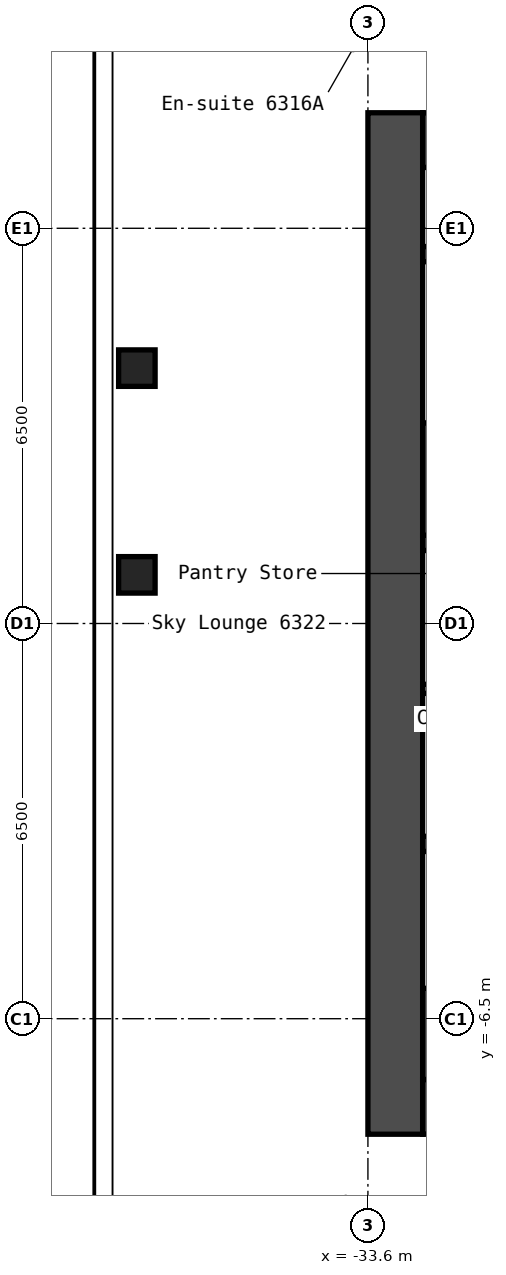
"""IFC4 building model, lengths in metres.
Left out: names, types, materials, properties, quantities, classifications, styles, units other than length and angle.
Written with IfcOpenShell. Run it as: python <this file> out.ifc"""

import sys

from ifc_helpers import new_model, si_unit, direction, frame, frame_2d, origin, origin_2d, place, context, subcontext, project, spatial, rectangle, hollow_rectangle, extrude, element, save


model = new_model("IFC4")
c1 = context("Model", 3, precision=1e-05, world=origin(), true_north=direction((0.0, 1.0)))
c2 = subcontext(c1, "Body", "Model", "MODEL_VIEW")
j1 = project(units=[si_unit("LENGTHUNIT", "METRE"), si_unit("PLANEANGLEUNIT", "RADIAN")], contexts=[c1])
p1 = place(None, origin())
s1 = spatial("IfcSite", under=j1, at=p1, CompositionType="ELEMENT")
p2 = place(p1, origin())
s2 = spatial("IfcBuilding", under=s1, at=p2, CompositionType="ELEMENT")
p3 = place(p2, frame((0.0, 0.0, 221.8)))
s3 = spatial("IfcBuildingStorey", under=s2, at=p3, CompositionType="ELEMENT", Elevation=221.8)
for number, where, z_axis, x_axis in (
    (1, (-37.4, 0.8, 0.0), (0.0, 0.0, 1.0), (1.0, 0.0, 0.0)),
    (2, (-37.4, 4.2, 0.0), (0.0, 0.0, 1.0), (1.0, 0.0, 0.0)),
):
    element("IfcColumn", number, at=place(p3, frame(where, z_axis=z_axis, x_axis=x_axis)), inside=s3, PredefinedType="COLUMN", context=c2, shape_type="SweptSolid", body=[
        extrude(hollow_rectangle(XDim=0.6, YDim=0.6, WallThickness=0.025, InnerFilletRadius=0.038, OuterFilletRadius=0.062, at=origin_2d()), origin(), (0.0, 0.0, 1.0), 2.75),
    ])
p4 = place(p3, frame((-33.15, -8.4, 0.0), z_axis=(0.0, 0.0, 1.0), x_axis=(0.0, 1.0, 0.0)))
e3 = element("IfcWall", 3, at=p4, inside=s3, PredefinedType="SHEAR", context=c2, shape_type="SweptSolid", body=[
    extrude(rectangle(XDim=16.8, YDim=0.9, at=frame_2d((8.4, 0.0))), origin(), (0.0, 0.0, 1.0), 2.75),
])
p5 = place(p3, frame((-32.7, 7.95, 0.0), z_axis=(0.0, 0.0, 1.0), x_axis=(1.0, 0.0, 0.0)))
e4 = element("IfcWall", 4, at=p5, inside=s3, PredefinedType="SHEAR", context=c2, shape_type="SweptSolid", body=[
    extrude(rectangle(XDim=15.0, YDim=0.9, at=frame_2d((7.5, 0.0))), origin(), (0.0, 0.0, 1.0), 2.75),
])
p6 = place(p5, frame((3.4, 0.0, 0.0)))
e5 = element("IfcOpeningElement", 5, at=p6, cuts=e4, PredefinedType="OPENING", context=c2, shape_type="SweptSolid", body=[
    extrude(rectangle(XDim=1.2, YDim=2.1, at=frame_2d((0.6, 1.05))), frame((0.0, 0.46, 0.0), z_axis=(0.0, -1.0, 0.0), x_axis=(1.0, 0.0, 0.0)), (0.0, 0.0, 1.0), 0.92),
])
p7 = place(p5, frame((0.75, 0.0, 0.0)))
e6 = element("IfcOpeningElement", 6, at=p7, cuts=e4, PredefinedType="OPENING", context=c2, shape_type="SweptSolid", body=[
    extrude(rectangle(XDim=0.9, YDim=2.1, at=frame_2d((0.45, 1.05))), frame((0.0, 0.46, 0.0), z_axis=(0.0, -1.0, 0.0), x_axis=(1.0, 0.0, 0.0)), (0.0, 0.0, 1.0), 0.92),
])
p8 = place(p3, frame((-32.7, -7.95, 0.0), z_axis=(0.0, 0.0, 1.0), x_axis=(1.0, 0.0, 0.0)))
e7 = element("IfcWall", 7, at=p8, inside=s3, PredefinedType="SHEAR", context=c2, shape_type="SweptSolid", body=[
    extrude(rectangle(XDim=15.0, YDim=0.9, at=frame_2d((7.5, 0.0))), origin(), (0.0, 0.0, 1.0), 2.75),
])
p9 = place(p8, frame((11.45, 0.0, 0.0)))
e8 = element("IfcOpeningElement", 8, at=p9, cuts=e7, PredefinedType="OPENING", context=c2, shape_type="SweptSolid", body=[
    extrude(rectangle(XDim=1.0, YDim=2.1, at=frame_2d((0.5, 1.05))), frame((0.0, 0.46, 0.0), z_axis=(0.0, -1.0, 0.0), x_axis=(1.0, 0.0, 0.0)), (0.0, 0.0, 1.0), 0.92),
])
p10 = place(p3, frame((-32.7, 1.325, 0.0), z_axis=(0.0, 0.0, 1.0), x_axis=(1.0, 0.0, 0.0)))
e9 = element("IfcWall", 9, at=p10, inside=s3, PredefinedType="SHEAR", context=c2, shape_type="SweptSolid", body=[
    extrude(rectangle(XDim=5.05, YDim=0.25, at=frame_2d((2.525, 0.0))), origin(), (0.0, 0.0, 1.0), 2.75),
])
p11 = place(p10, frame((3.3, 0.0, 0.0)))
e10 = element("IfcOpeningElement", 10, at=p11, cuts=e9, PredefinedType="OPENING", context=c2, shape_type="SweptSolid", body=[
    extrude(rectangle(XDim=1.2, YDim=2.1, at=frame_2d((0.6, 1.05))), frame((0.0, 0.135, 0.0), z_axis=(0.0, -1.0, 0.0), x_axis=(1.0, 0.0, 0.0)), (0.0, 0.0, 1.0), 0.27),
])
p12 = place(p3, frame((-32.7, 2.375, 0.0), z_axis=(0.0, 0.0, 1.0), x_axis=(1.0, 0.0, 0.0)))
e11 = element("IfcWall", 11, at=p12, inside=s3, PredefinedType="SHEAR", context=c2, shape_type="SweptSolid", body=[
    extrude(rectangle(XDim=2.4, YDim=1.85, at=frame_2d((1.2, 0.0))), origin(), (0.0, 0.0, 1.0), 2.75),
])
p13 = place(p3, frame((-32.7, 6.075, 0.0), z_axis=(0.0, 0.0, 1.0), x_axis=(1.0, 0.0, 0.0)))
e12 = element("IfcWall", 12, at=p13, inside=s3, PredefinedType="SHEAR", context=c2, shape_type="SweptSolid", body=[
    extrude(rectangle(XDim=2.4, YDim=0.25, at=frame_2d((1.2, 0.0))), origin(), (0.0, 0.0, 1.0), 2.75),
])
p14 = place(p3, frame((-32.7, -3.625, 0.0), z_axis=(0.0, 0.0, 1.0), x_axis=(1.0, 0.0, 0.0)))
e13 = element("IfcWall", 13, at=p14, inside=s3, PredefinedType="SHEAR", context=c2, shape_type="SweptSolid", body=[
    extrude(rectangle(XDim=4.55, YDim=0.25, at=frame_2d((2.275, 0.0))), origin(), (0.0, 0.0, 1.0), 2.75),
])
p15 = place(p14, frame((2.85, 0.0, 0.0)))
e14 = element("IfcOpeningElement", 14, at=p15, cuts=e13, PredefinedType="OPENING", context=c2, shape_type="SweptSolid", body=[
    extrude(rectangle(XDim=1.1, YDim=2.1, at=frame_2d((0.55, 1.05))), frame((0.0, 0.135, 0.0), z_axis=(0.0, -1.0, 0.0), x_axis=(1.0, 0.0, 0.0)), (0.0, 0.0, 1.0), 0.27),
])
p16 = place(p14, frame((0.6, 0.0, 0.0)))
e15 = element("IfcOpeningElement", 15, at=p16, cuts=e13, PredefinedType="OPENING", context=c2, shape_type="SweptSolid", body=[
    extrude(rectangle(XDim=1.1, YDim=2.1, at=frame_2d((0.55, 1.05))), frame((0.0, 0.135, 0.0), z_axis=(0.0, -1.0, 0.0), x_axis=(1.0, 0.0, 0.0)), (0.0, 0.0, 1.0), 0.27),
])
p17 = place(p3, frame((-32.7, -6.75, 0.0), z_axis=(0.0, 0.0, 1.0), x_axis=(1.0, 0.0, 0.0)))
e16 = element("IfcWall", 16, at=p17, inside=s3, PredefinedType="SHEAR", context=c2, shape_type="SweptSolid", body=[
    extrude(rectangle(XDim=4.55, YDim=1.5, at=frame_2d((2.275, 0.0))), origin(), (0.0, 0.0, 1.0), 2.75),
])
p18 = place(p3, frame((-32.7, -1.075, 0.0), z_axis=(0.0, 0.0, 1.0), x_axis=(1.0, 0.0, 0.0)))
e17 = element("IfcWall", 17, at=p18, inside=s3, PredefinedType="PARTITIONING", context=c2, shape_type="SweptSolid", body=[
    extrude(rectangle(XDim=3.0, YDim=0.15, at=frame_2d((1.5, 0.0))), origin(), (0.0, 0.0, 1.0), 2.75),
])
save(model, sys.argv[1])
